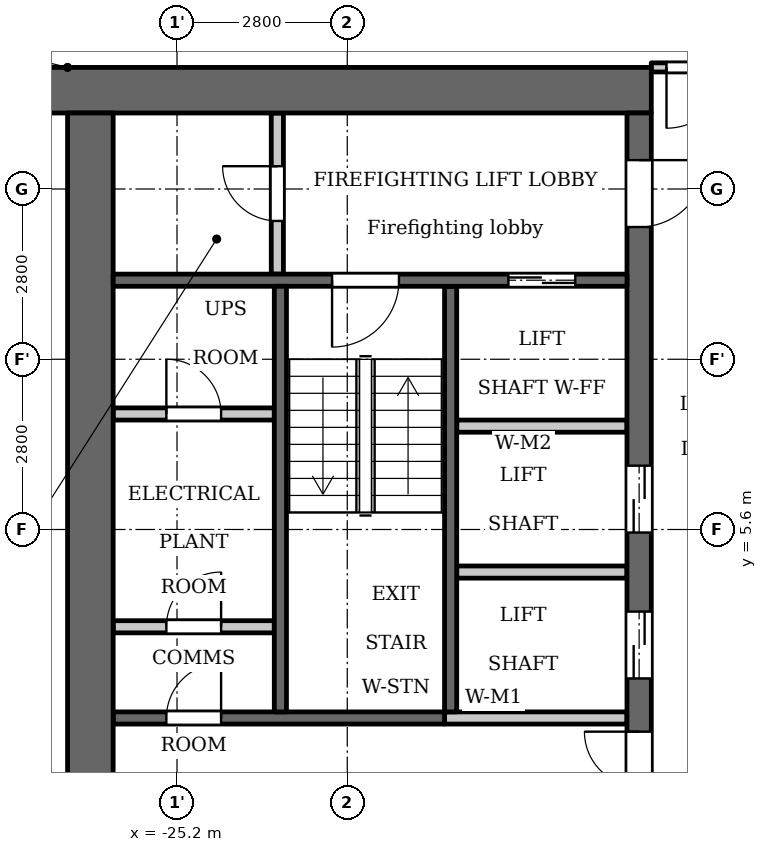
"""IFC4 building model, lengths in metres.
Left out: names, types, materials, properties, quantities, classifications, styles, units other than length and angle.
Written with IfcOpenShell. Run it as: python <this file> out.ifc"""

import sys

from ifc_helpers import new_model, si_unit, direction, frame, frame_2d, origin, place, context, subcontext, project, spatial, rectangle, extrude, element, fill, save


model = new_model("IFC4")
c1 = context("Model", 3, precision=1e-05, world=origin(), true_north=direction((0.0, 1.0)))
c2 = subcontext(c1, "Body", "Model", "MODEL_VIEW")
j1 = project(units=[si_unit("LENGTHUNIT", "METRE"), si_unit("PLANEANGLEUNIT", "RADIAN")], contexts=[c1])
p1 = place(None, origin())
s1 = spatial("IfcSite", under=j1, at=p1, CompositionType="ELEMENT")
p2 = place(p1, origin())
s2 = spatial("IfcBuilding", under=s1, at=p2, CompositionType="ELEMENT")
p3 = place(p2, frame((0.0, 0.0, 153.6)))
s3 = spatial("IfcBuildingStorey", under=s2, at=p3, CompositionType="ELEMENT", Elevation=153.6)
p4 = place(p3, frame((-20.7, 2.6, 0.0), z_axis=(0.0, 0.0, 1.0), x_axis=(0.0, 1.0, 0.0)))
e1 = element("IfcWall", 1, at=p4, inside=s3, PredefinedType="SHEAR", context=c2, shape_type="SweptSolid", body=[
    extrude(rectangle(XDim=7.0, YDim=0.2, at=frame_2d((3.5, 0.0))), origin(), (0.0, 0.0, 1.0), 3.2),
])
p5 = place(p3, frame((-20.8, 2.5, 0.0), z_axis=(0.0, 0.0, 1.0), x_axis=(-1.0, 0.0, 0.0)))
e2 = element("IfcWall", 2, at=p5, inside=s3, PredefinedType="SHEAR", context=c2, shape_type="SweptSolid", body=[
    extrude(rectangle(XDim=5.45, YDim=0.2, at=frame_2d((2.725, 0.0))), origin(), (0.0, 0.0, 1.0), 3.2),
])
p6 = place(p5, frame((3.675, 0.0, 0.0)))
e3 = element("IfcOpeningElement", 3, at=p6, cuts=e2, PredefinedType="OPENING", context=c2, shape_type="SweptSolid", body=[
    extrude(rectangle(XDim=0.9, YDim=2.1, at=frame_2d((0.45, 1.05))), frame((0.0, 0.11, 0.0), z_axis=(0.0, -1.0, 0.0), x_axis=(1.0, 0.0, 0.0)), (0.0, 0.0, 1.0), 0.22),
])
p7 = place(p3, frame((-17.4, 12.825, 0.0), z_axis=(0.0, 0.0, 1.0), x_axis=(-1.0, 0.0, 0.0)))
e4 = element("IfcWall", 4, at=p7, inside=s3, PredefinedType="SHEAR", context=c2, shape_type="SweptSolid", body=[
    extrude(rectangle(XDim=10.4, YDim=0.75, at=frame_2d((5.2, 0.0))), origin(), (0.0, 0.0, 1.0), 3.2),
])
p8 = place(p3, frame((-17.6, -12.45, 0.0), z_axis=(0.0, 0.0, 1.0), x_axis=(0.0, 1.0, 0.0)))
e5 = element("IfcWall", 5, at=p8, inside=s3, PredefinedType="SHEAR", context=c2, shape_type="SweptSolid", body=[
    extrude(rectangle(XDim=24.9, YDim=0.4, at=frame_2d((12.45, 0.0))), origin(), (0.0, 0.0, 1.0), 3.2),
])
p9 = place(p8, frame((6.325, 0.0, 0.0)))
e6 = element("IfcOpeningElement", 6, at=p9, cuts=e5, PredefinedType="OPENING", context=c2, shape_type="SweptSolid", body=[
    extrude(rectangle(XDim=0.9, YDim=2.1, at=frame_2d((0.45, 1.05))), frame((0.0, 0.21, 0.0), z_axis=(0.0, -1.0, 0.0), x_axis=(1.0, 0.0, 0.0)), (0.0, 0.0, 1.0), 0.42),
])
p10 = place(p8, frame((9.925, 0.0, 0.0)))
e7 = element("IfcOpeningElement", 7, at=p10, cuts=e5, PredefinedType="OPENING", context=c2, shape_type="SweptSolid", body=[
    extrude(rectangle(XDim=0.9, YDim=2.1, at=frame_2d((0.45, 1.05))), frame((0.0, 0.21, 0.0), z_axis=(0.0, -1.0, 0.0), x_axis=(1.0, 0.0, 0.0)), (0.0, 0.0, 1.0), 0.42),
])
p11 = place(p8, frame((15.6, 0.0, 0.0)))
e8 = element("IfcOpeningElement", 8, at=p11, cuts=e5, PredefinedType="OPENING", context=c2, shape_type="SweptSolid", body=[
    extrude(rectangle(XDim=1.1, YDim=2.1, at=frame_2d((0.55, 1.05))), frame((0.0, 0.21, 0.0), z_axis=(0.0, -1.0, 0.0), x_axis=(1.0, 0.0, 0.0)), (0.0, 0.0, 1.0), 0.42),
])
p12 = place(p8, frame((18.0, 0.0, 0.0)))
e9 = element("IfcOpeningElement", 9, at=p12, cuts=e5, PredefinedType="OPENING", context=c2, shape_type="SweptSolid", body=[
    extrude(rectangle(XDim=1.1, YDim=2.1, at=frame_2d((0.55, 1.05))), frame((0.0, 0.21, 0.0), z_axis=(0.0, -1.0, 0.0), x_axis=(1.0, 0.0, 0.0)), (0.0, 0.0, 1.0), 0.42),
])
p13 = place(p8, frame((23.025, 0.0, 0.0)))
e10 = element("IfcOpeningElement", 10, at=p13, cuts=e5, PredefinedType="OPENING", context=c2, shape_type="SweptSolid", body=[
    extrude(rectangle(XDim=1.1, YDim=2.1, at=frame_2d((0.55, 1.05))), frame((0.0, 0.21, 0.0), z_axis=(0.0, -1.0, 0.0), x_axis=(1.0, 0.0, 0.0)), (0.0, 0.0, 1.0), 0.42),
])
p14 = place(p8, frame((0.775, 0.0, 0.0)))
e11 = element("IfcOpeningElement", 11, at=p14, cuts=e5, PredefinedType="OPENING", context=c2, shape_type="SweptSolid", body=[
    extrude(rectangle(XDim=1.1, YDim=2.1, at=frame_2d((0.55, 1.05))), frame((0.0, 0.21, 0.0), z_axis=(0.0, -1.0, 0.0), x_axis=(1.0, 0.0, 0.0)), (0.0, 0.0, 1.0), 0.42),
])
p15 = place(p8, frame((12.925, 0.0, 0.0)))
e12 = element("IfcOpeningElement", 12, at=p15, cuts=e5, PredefinedType="OPENING", context=c2, shape_type="SweptSolid", body=[
    extrude(rectangle(XDim=1.8, YDim=2.1, at=frame_2d((0.9, 1.05))), frame((0.0, 0.21, 0.0), z_axis=(0.0, -1.0, 0.0), x_axis=(1.0, 0.0, 0.0)), (0.0, 0.0, 1.0), 0.42),
])
p16 = place(p3, frame((-26.625, -12.45, 0.0), z_axis=(0.0, 0.0, 1.0), x_axis=(0.0, 1.0, 0.0)))
e13 = element("IfcWall", 13, at=p16, inside=s3, PredefinedType="SHEAR", context=c2, shape_type="SweptSolid", body=[
    extrude(rectangle(XDim=24.9, YDim=0.75, at=frame_2d((12.45, 0.0))), origin(), (0.0, 0.0, 1.0), 3.2),
])
p17 = place(p3, frame((-23.55, 9.8, 0.0), z_axis=(0.0, 0.0, 1.0), x_axis=(0.0, 1.0, 0.0)))
e14 = element("IfcWall", 14, at=p17, inside=s3, PredefinedType="PARTITIONING", context=c2, shape_type="SweptSolid", body=[
    extrude(rectangle(XDim=2.65, YDim=0.2, at=frame_2d((1.325, 0.0))), origin(), (0.0, 0.0, 1.0), 3.2),
])
p18 = place(p17, frame((0.875, 0.0, 0.0)))
e15 = element("IfcOpeningElement", 15, at=p18, cuts=e14, PredefinedType="OPENING", context=c2, shape_type="SweptSolid", body=[
    extrude(rectangle(XDim=0.9, YDim=2.1, at=frame_2d((0.45, 1.05))), frame((0.0, 0.11, 0.0), z_axis=(0.0, -1.0, 0.0), x_axis=(1.0, 0.0, 0.0)), (0.0, 0.0, 1.0), 0.22),
])
p19 = place(p3, frame((-23.6, 4.0, 0.0), z_axis=(0.0, 0.0, 1.0), x_axis=(-1.0, 0.0, 0.0)))
e16 = element("IfcWall", 16, at=p19, inside=s3, PredefinedType="PARTITIONING", context=c2, shape_type="SweptSolid", body=[
    extrude(rectangle(XDim=2.65, YDim=0.2, at=frame_2d((1.325, 0.0))), origin(), (0.0, 0.0, 1.0), 3.2),
])
p20 = place(p19, frame((0.875, 0.0, 0.0)))
e17 = element("IfcOpeningElement", 17, at=p20, cuts=e16, PredefinedType="OPENING", context=c2, shape_type="SweptSolid", body=[
    extrude(rectangle(XDim=0.9, YDim=2.1, at=frame_2d((0.45, 1.05))), frame((0.0, 0.11, 0.0), z_axis=(0.0, -1.0, 0.0), x_axis=(1.0, 0.0, 0.0)), (0.0, 0.0, 1.0), 0.22),
])
p21 = place(p3, frame((-23.6, 7.5, 0.0), z_axis=(0.0, 0.0, 1.0), x_axis=(-1.0, 0.0, 0.0)))
e18 = element("IfcWall", 18, at=p21, inside=s3, PredefinedType="PARTITIONING", context=c2, shape_type="SweptSolid", body=[
    extrude(rectangle(XDim=2.65, YDim=0.2, at=frame_2d((1.325, 0.0))), origin(), (0.0, 0.0, 1.0), 3.2),
])
p22 = place(p21, frame((0.875, 0.0, 0.0)))
e19 = element("IfcOpeningElement", 19, at=p22, cuts=e18, PredefinedType="OPENING", context=c2, shape_type="SweptSolid", body=[
    extrude(rectangle(XDim=0.9, YDim=2.1, at=frame_2d((0.45, 1.05))), frame((0.0, 0.11, 0.0), z_axis=(0.0, -1.0, 0.0), x_axis=(1.0, 0.0, 0.0)), (0.0, 0.0, 1.0), 0.22),
])
p23 = place(p3, frame((-17.8, 2.5, 0.0), z_axis=(0.0, 0.0, 1.0), x_axis=(-1.0, 0.0, 0.0)))
e20 = element("IfcWall", 20, at=p23, inside=s3, PredefinedType="PARTITIONING", context=c2, shape_type="SweptSolid", body=[
    extrude(rectangle(XDim=3.0, YDim=0.2, at=frame_2d((1.5, 0.0))), origin(), (0.0, 0.0, 1.0), 3.2),
])
for number, where, z_axis, x_axis in (
    (21, (-17.8, 4.9, 0.0), (0.0, 0.0, 1.0), (-1.0, 0.0, 0.0)),
    (22, (-17.8, 7.3, 0.0), (0.0, 0.0, 1.0), (-1.0, 0.0, 0.0)),
):
    element("IfcWall", number, at=place(p3, frame(where, z_axis=z_axis, x_axis=x_axis)), inside=s3, PredefinedType="PARTITIONING", context=c2, shape_type="SweptSolid", body=[
        extrude(rectangle(XDim=2.8, YDim=0.2, at=frame_2d((1.4, 0.0))), origin(), (0.0, 0.0, 1.0), 3.2),
    ])
p24 = place(p3, frame((-17.8, 9.7, 0.0), z_axis=(0.0, 0.0, 1.0), x_axis=(-1.0, 0.0, 0.0)))
e23 = element("IfcWall", 23, at=p24, inside=s3, PredefinedType="SHEAR", context=c2, shape_type="SweptSolid", body=[
    extrude(rectangle(XDim=8.45, YDim=0.2, at=frame_2d((4.225, 0.0))), origin(), (0.0, 0.0, 1.0), 3.2),
])
p25 = place(p24, frame((0.85, 0.0, 0.0)))
e24 = element("IfcOpeningElement", 24, at=p25, cuts=e23, PredefinedType="OPENING", context=c2, shape_type="SweptSolid", body=[
    extrude(rectangle(XDim=1.1, YDim=2.1, at=frame_2d((0.55, 1.05))), frame((0.0, 0.11, 0.0), z_axis=(0.0, -1.0, 0.0), x_axis=(1.0, 0.0, 0.0)), (0.0, 0.0, 1.0), 0.22),
])
p26 = place(p24, frame((3.75, 0.0, 0.0)))
e25 = element("IfcOpeningElement", 25, at=p26, cuts=e23, PredefinedType="OPENING", context=c2, shape_type="SweptSolid", body=[
    extrude(rectangle(XDim=1.1, YDim=2.1, at=frame_2d((0.55, 1.05))), frame((0.0, 0.11, 0.0), z_axis=(0.0, -1.0, 0.0), x_axis=(1.0, 0.0, 0.0)), (0.0, 0.0, 1.0), 0.22),
])
p27 = place(p3, frame((-23.5, 2.6, 0.0), z_axis=(0.0, 0.0, 1.0), x_axis=(0.0, 1.0, 0.0)))
e26 = element("IfcWall", 26, at=p27, inside=s3, PredefinedType="SHEAR", context=c2, shape_type="SweptSolid", body=[
    extrude(rectangle(XDim=7.0, YDim=0.2, at=frame_2d((3.5, 0.0))), origin(), (0.0, 0.0, 1.0), 3.2),
])
p28 = place(p3, frame((-17.4, 13.2, 0.0), z_axis=(0.0, 0.0, 1.0), x_axis=(1.0, 0.0, 0.0)))
e27 = element("IfcWall", 27, at=p28, inside=s3, PredefinedType="PARTITIONING", context=c2, shape_type="SweptSolid", body=[
    extrude(rectangle(XDim=34.8, YDim=0.15, at=frame_2d((17.4, 0.0))), origin(), (0.0, 0.0, 1.0), 3.2),
])
p29 = place(p28, frame((0.25, 0.0, 0.0)))
e28 = element("IfcOpeningElement", 28, at=p29, cuts=e27, PredefinedType="OPENING", context=c2, shape_type="SweptSolid", body=[
    extrude(rectangle(XDim=1.0, YDim=2.1, at=frame_2d((0.5, 1.05))), frame((0.0, 0.085, 0.0), z_axis=(0.0, -1.0, 0.0), x_axis=(1.0, 0.0, 0.0)), (0.0, 0.0, 1.0), 0.17),
])
p30 = place(p28, frame((33.65, 0.0, 0.0)))
e29 = element("IfcOpeningElement", 29, at=p30, cuts=e27, PredefinedType="OPENING", context=c2, shape_type="SweptSolid", body=[
    extrude(rectangle(XDim=1.0, YDim=2.1, at=frame_2d((0.5, 1.05))), frame((0.0, 0.085, 0.0), z_axis=(0.0, -1.0, 0.0), x_axis=(1.0, 0.0, 0.0)), (0.0, 0.0, 1.0), 0.17),
])
p31 = place(p28, frame((13.75, 0.0, 0.0)))
e30 = element("IfcOpeningElement", 30, at=p31, cuts=e27, PredefinedType="OPENING", context=c2, shape_type="SweptSolid", body=[
    extrude(rectangle(XDim=1.0, YDim=2.1, at=frame_2d((0.5, 1.05))), frame((0.0, 0.085, 0.0), z_axis=(0.0, -1.0, 0.0), x_axis=(1.0, 0.0, 0.0)), (0.0, 0.0, 1.0), 0.17),
])
p32 = place(p11, origin())
e31 = element("IfcDoor", 31, at=p32, inside=s3, OperationType="DOUBLE_DOOR_SLIDING", PredefinedType="DOOR", context=c2, shape_type="SweptSolid", body=[
    extrude(rectangle(XDim=1.1, YDim=2.1, at=frame_2d((0.55, 1.05))), frame((0.0, 0.025, 0.0), z_axis=(0.0, -1.0, 0.0), x_axis=(1.0, 0.0, 0.0)), (0.0, 0.0, 1.0), 0.05),
])
fill(e8, e31)
p33 = place(p12, origin())
e32 = element("IfcDoor", 32, at=p33, inside=s3, OperationType="DOUBLE_DOOR_SLIDING", PredefinedType="DOOR", context=c2, shape_type="SweptSolid", body=[
    extrude(rectangle(XDim=1.1, YDim=2.1, at=frame_2d((0.55, 1.05))), frame((0.0, 0.025, 0.0), z_axis=(0.0, -1.0, 0.0), x_axis=(1.0, 0.0, 0.0)), (0.0, 0.0, 1.0), 0.05),
])
fill(e9, e32)
p34 = place(p25, origin())
e33 = element("IfcDoor", 33, at=p34, inside=s3, OperationType="DOUBLE_DOOR_SLIDING", PredefinedType="DOOR", context=c2, shape_type="SweptSolid", body=[
    extrude(rectangle(XDim=1.1, YDim=2.1, at=frame_2d((0.55, 1.05))), frame((0.0, 0.025, 0.0), z_axis=(0.0, -1.0, 0.0), x_axis=(1.0, 0.0, 0.0)), (0.0, 0.0, 1.0), 0.05),
])
fill(e24, e33)
p35 = place(p13, origin())
e34 = element("IfcDoor", 34, at=p35, inside=s3, OperationType="SINGLE_SWING_RIGHT", PredefinedType="DOOR", context=c2, shape_type="SweptSolid", body=[
    extrude(rectangle(XDim=1.1, YDim=2.1, at=frame_2d((0.55, 1.05))), frame((0.0, 0.025, 0.0), z_axis=(0.0, -1.0, 0.0), x_axis=(1.0, 0.0, 0.0)), (0.0, 0.0, 1.0), 0.05),
])
fill(e10, e34)
p36 = place(p18, origin())
e35 = element("IfcDoor", 35, at=p36, inside=s3, OperationType="SINGLE_SWING_LEFT", PredefinedType="DOOR", context=c2, shape_type="SweptSolid", body=[
    extrude(rectangle(XDim=0.9, YDim=2.1, at=frame_2d((0.45, 1.05))), frame((0.0, 0.025, 0.0), z_axis=(0.0, -1.0, 0.0), x_axis=(1.0, 0.0, 0.0)), (0.0, 0.0, 1.0), 0.05),
])
fill(e15, e35)
p37 = place(p26, origin())
e36 = element("IfcDoor", 36, at=p37, inside=s3, OperationType="SINGLE_SWING_LEFT", PredefinedType="DOOR", context=c2, shape_type="SweptSolid", body=[
    extrude(rectangle(XDim=1.1, YDim=2.1, at=frame_2d((0.55, 1.05))), frame((0.0, 0.025, 0.0), z_axis=(0.0, -1.0, 0.0), x_axis=(1.0, 0.0, 0.0)), (0.0, 0.0, 1.0), 0.05),
])
fill(e25, e36)
p38 = place(p15, origin())
e37 = element("IfcDoor", 37, at=p38, inside=s3, OperationType="DOUBLE_DOOR_SINGLE_SWING", PredefinedType="DOOR", context=c2, shape_type="SweptSolid", body=[
    extrude(rectangle(XDim=1.8, YDim=2.1, at=frame_2d((0.9, 1.05))), frame((0.0, 0.025, 0.0), z_axis=(0.0, -1.0, 0.0), x_axis=(1.0, 0.0, 0.0)), (0.0, 0.0, 1.0), 0.05),
])
fill(e12, e37)
p39 = place(p20, origin())
e38 = element("IfcDoor", 38, at=p39, inside=s3, OperationType="SINGLE_SWING_LEFT", PredefinedType="DOOR", context=c2, shape_type="SweptSolid", body=[
    extrude(rectangle(XDim=0.9, YDim=2.1, at=frame_2d((0.45, 1.05))), frame((0.0, 0.025, 0.0), z_axis=(0.0, -1.0, 0.0), x_axis=(1.0, 0.0, 0.0)), (0.0, 0.0, 1.0), 0.05),
])
fill(e17, e38)
p40 = place(p22, origin())
e39 = element("IfcDoor", 39, at=p40, inside=s3, OperationType="SINGLE_SWING_RIGHT", PredefinedType="DOOR", context=c2, shape_type="SweptSolid", body=[
    extrude(rectangle(XDim=0.9, YDim=2.1, at=frame_2d((0.45, 1.05))), frame((0.0, 0.025, 0.0), z_axis=(0.0, -1.0, 0.0), x_axis=(1.0, 0.0, 0.0)), (0.0, 0.0, 1.0), 0.05),
])
fill(e19, e39)
p41 = place(p6, origin())
e40 = element("IfcDoor", 40, at=p41, inside=s3, OperationType="SINGLE_SWING_LEFT", PredefinedType="DOOR", context=c2, shape_type="SweptSolid", body=[
    extrude(rectangle(XDim=0.9, YDim=2.1, at=frame_2d((0.45, 1.05))), frame((0.0, 0.025, 0.0), z_axis=(0.0, -1.0, 0.0), x_axis=(1.0, 0.0, 0.0)), (0.0, 0.0, 1.0), 0.05),
])
fill(e3, e40)
p42 = place(p29, origin())
e41 = element("IfcDoor", 41, at=p42, inside=s3, OperationType="SINGLE_SWING_LEFT", PredefinedType="DOOR", context=c2, shape_type="SweptSolid", body=[
    extrude(rectangle(XDim=1.0, YDim=2.1, at=frame_2d((0.5, 1.05))), frame((0.0, 0.025, 0.0), z_axis=(0.0, -1.0, 0.0), x_axis=(1.0, 0.0, 0.0)), (0.0, 0.0, 1.0), 0.05),
])
fill(e28, e41)
save(model, sys.argv[1])
